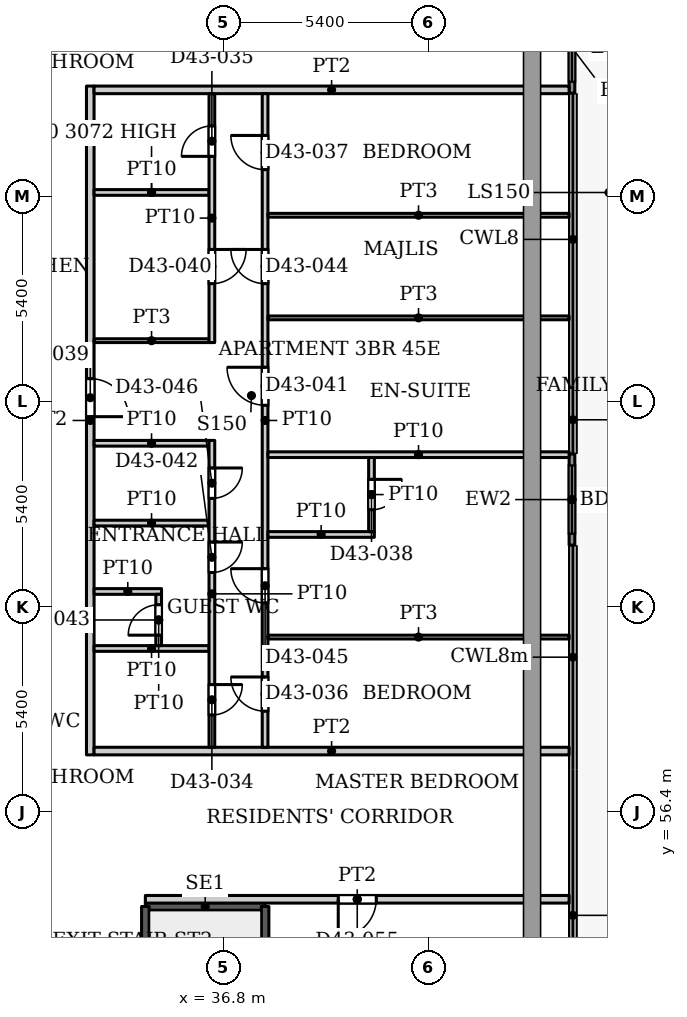
"""IFC4 building model, lengths in metres.
Left out: names, types, materials, properties, quantities, classifications, styles, units other than length and angle.
Written with IfcOpenShell. Run it as: python <this file> out.ifc"""

import sys

from ifc_helpers import new_model, si_unit, direction, frame, frame_2d, origin, place, context, subcontext, project, spatial, rectangle, extrude, source, transform, mapped, element, fill, save


model = new_model("IFC4")
c1 = context("Model", 3, precision=1e-05, world=origin(), true_north=direction((0.0, 1.0)))
c2 = subcontext(c1, "Body", "Model", "MODEL_VIEW")
j1 = project(units=[si_unit("LENGTHUNIT", "METRE"), si_unit("PLANEANGLEUNIT", "RADIAN")], contexts=[c1])
p1 = place(None, origin())
s1 = spatial("IfcSite", under=j1, at=p1, CompositionType="ELEMENT")
p2 = place(p1, origin())
s2 = spatial("IfcBuilding", under=s1, at=p2, CompositionType="ELEMENT")
p3 = place(p2, frame((0.0, 0.0, 191.6)))
s3 = spatial("IfcBuildingStorey", under=s2, at=p3, CompositionType="ELEMENT", Elevation=191.6)
p4 = place(p3, frame((45.975, 77.712, 0.0), z_axis=(0.0, 0.0, 1.0), x_axis=(0.0, -1.0, 0.0)))
e1 = element("IfcWall", 1, at=p4, inside=s3, PredefinedType="SOLIDWALL", context=c2, shape_type="SweptSolid", body=[
    extrude(rectangle(XDim=2.4, YDim=0.15, at=frame_2d((1.2, 0.0))), origin(), (0.0, 0.0, 1.0), 3.75),
])
p5 = place(p4, frame((0.3, 0.0, 0.0)))
e2 = element("IfcOpeningElement", 2, at=p5, cuts=e1, PredefinedType="OPENING", context=c2, shape_type="SweptSolid", body=[
    extrude(rectangle(XDim=1.8, YDim=2.4, at=frame_2d((0.9, 1.2))), frame((0.0, 0.085, 0.0), z_axis=(0.0, -1.0, 0.0), x_axis=(1.0, 0.0, 0.0)), (0.0, 0.0, 1.0), 0.17),
])
p6 = place(p3, frame((45.975, 65.818, 0.0), z_axis=(0.0, 0.0, 1.0), x_axis=(0.0, -1.0, 0.0)))
e3 = element("IfcWall", 3, at=p6, inside=s3, PredefinedType="SOLIDWALL", context=c2, shape_type="SweptSolid", body=[
    extrude(rectangle(XDim=2.4, YDim=0.15, at=frame_2d((1.2, 0.0))), origin(), (0.0, 0.0, 1.0), 3.75),
])
p7 = place(p6, frame((0.3, 0.0, 0.0)))
e4 = element("IfcOpeningElement", 4, at=p7, cuts=e3, PredefinedType="OPENING", context=c2, shape_type="SweptSolid", body=[
    extrude(rectangle(XDim=1.8, YDim=2.4, at=frame_2d((0.9, 1.2))), frame((0.0, 0.085, 0.0), z_axis=(0.0, -1.0, 0.0), x_axis=(1.0, 0.0, 0.0)), (0.0, 0.0, 1.0), 0.17),
])
p8 = place(p3, frame((34.75, 53.91, 0.0), z_axis=(0.0, 0.0, 1.0), x_axis=(1.0, 0.0, 0.0)))
e5 = element("IfcWall", 5, at=p8, inside=s3, PredefinedType="SHEAR", context=c2, shape_type="SweptSolid", body=[
    extrude(rectangle(XDim=3.15, YDim=0.2, at=frame_2d((1.575, 0.0))), origin(), (0.0, 0.0, 1.0), 3.9),
])
p9 = place(p3, frame((34.75, 47.5, 0.0), z_axis=(0.0, 0.0, 1.0), x_axis=(0.0, 1.0, 0.0)))
e6 = element("IfcWall", 6, at=p9, inside=s3, PredefinedType="SHEAR", context=c2, shape_type="SweptSolid", body=[
    extrude(rectangle(XDim=6.41, YDim=0.2, at=frame_2d((3.205, 0.0))), origin(), (0.0, 0.0, 1.0), 3.9),
])
p10 = place(p3, frame((37.9, 44.75, 0.0), z_axis=(0.0, 0.0, 1.0), x_axis=(0.0, 1.0, 0.0)))
e7 = element("IfcWall", 7, at=p10, inside=s3, PredefinedType="SHEAR", context=c2, shape_type="SweptSolid", body=[
    extrude(rectangle(XDim=9.16, YDim=0.2, at=frame_2d((4.58, 0.0))), origin(), (0.0, 0.0, 1.0), 3.9),
])
p11 = place(p3, frame((33.3, 57.9, 0.0), z_axis=(0.0, 0.0, 1.0), x_axis=(0.0, 1.0, 0.0)))
e8 = element("IfcWall", 8, at=p11, inside=s3, PredefinedType="PARTITIONING", context=c2, shape_type="SweptSolid", body=[
    extrude(rectangle(XDim=17.6, YDim=0.2, at=frame_2d((8.8, 0.0))), origin(), (0.0, 0.0, 1.0), 3.6),
])
p12 = place(p11, frame((8.9, 0.0, 0.0)))
e9 = element("IfcOpeningElement", 9, at=p12, cuts=e8, PredefinedType="OPENING", context=c2, shape_type="SweptSolid", body=[
    extrude(rectangle(XDim=1.0, YDim=2.1, at=frame_2d((0.5, 1.05))), frame((0.0, 0.11, 0.0), z_axis=(0.0, -1.0, 0.0), x_axis=(1.0, 0.0, 0.0)), (0.0, 0.0, 1.0), 0.22),
])
p13 = place(p3, frame((33.4, 58.0, 0.0), z_axis=(0.0, 0.0, 1.0), x_axis=(1.0, 0.0, 0.0)))
e10 = element("IfcWall", 10, at=p13, inside=s3, PredefinedType="PARTITIONING", context=c2, shape_type="SweptSolid", body=[
    extrude(rectangle(XDim=12.5, YDim=0.2, at=frame_2d((6.25, 0.0))), origin(), (0.0, 0.0, 1.0), 3.6),
])
p14 = place(p3, frame((33.4, 60.7, 0.0), z_axis=(0.0, 0.0, 1.0), x_axis=(1.0, 0.0, 0.0)))
e11 = element("IfcWall", 11, at=p14, inside=s3, PredefinedType="PARTITIONING", context=c2, shape_type="SweptSolid", body=[
    extrude(rectangle(XDim=3.025, YDim=0.15, at=frame_2d((1.513, 0.0))), origin(), (0.0, 0.0, 1.0), 3.6),
])
p15 = place(p3, frame((33.4, 62.2, 0.0), z_axis=(0.0, 0.0, 1.0), x_axis=(1.0, 0.0, 0.0)))
e12 = element("IfcWall", 12, at=p15, inside=s3, PredefinedType="PARTITIONING", context=c2, shape_type="SweptSolid", body=[
    extrude(rectangle(XDim=1.775, YDim=0.15, at=frame_2d((0.888, 0.0))), origin(), (0.0, 0.0, 1.0), 3.6),
])
for number, where, z_axis, x_axis in (
    (13, (33.4, 64.0, 0.0), (0.0, 0.0, 1.0), (1.0, 0.0, 0.0)),
    (14, (33.4, 66.1, 0.0), (0.0, 0.0, 1.0), (1.0, 0.0, 0.0)),
):
    element("IfcWall", number, at=place(p3, frame(where, z_axis=z_axis, x_axis=x_axis)), inside=s3, PredefinedType="PARTITIONING", context=c2, shape_type="SweptSolid", body=[
        extrude(rectangle(XDim=3.025, YDim=0.15, at=frame_2d((1.513, 0.0))), origin(), (0.0, 0.0, 1.0), 3.6),
    ])
p16 = place(p3, frame((33.4, 68.8, 0.0), z_axis=(0.0, 0.0, 1.0), x_axis=(1.0, 0.0, 0.0)))
e15 = element("IfcWall", 15, at=p16, inside=s3, PredefinedType="PARTITIONING", context=c2, shape_type="SweptSolid", body=[
    extrude(rectangle(XDim=3.025, YDim=0.1, at=frame_2d((1.513, 0.0))), origin(), (0.0, 0.0, 1.0), 3.6),
])
p17 = place(p3, frame((33.4, 72.7, 0.0), z_axis=(0.0, 0.0, 1.0), x_axis=(1.0, 0.0, 0.0)))
e16 = element("IfcWall", 16, at=p17, inside=s3, PredefinedType="PARTITIONING", context=c2, shape_type="SweptSolid", body=[
    extrude(rectangle(XDim=3.025, YDim=0.15, at=frame_2d((1.513, 0.0))), origin(), (0.0, 0.0, 1.0), 3.072),
])
p18 = place(p3, frame((33.4, 75.4, 0.0), z_axis=(0.0, 0.0, 1.0), x_axis=(1.0, 0.0, 0.0)))
e17 = element("IfcWall", 17, at=p18, inside=s3, PredefinedType="PARTITIONING", context=c2, shape_type="SweptSolid", body=[
    extrude(rectangle(XDim=12.5, YDim=0.2, at=frame_2d((6.25, 0.0))), origin(), (0.0, 0.0, 1.0), 3.6),
])
p19 = place(p3, frame((34.75, 54.1, 0.0), z_axis=(0.0, 0.0, 1.0), x_axis=(1.0, 0.0, 0.0)))
e18 = element("IfcWall", 18, at=p19, inside=s3, PredefinedType="PARTITIONING", context=c2, shape_type="SweptSolid", body=[
    extrude(rectangle(XDim=11.15, YDim=0.2, at=frame_2d((5.575, 0.0))), origin(), (0.0, 0.0, 1.0), 3.6),
])
p20 = place(p19, frame((5.075, 0.0, 0.0)))
e19 = element("IfcOpeningElement", 19, at=p20, cuts=e18, PredefinedType="OPENING", context=c2, shape_type="SweptSolid", body=[
    extrude(rectangle(XDim=1.0, YDim=2.1, at=frame_2d((0.5, 1.05))), frame((0.0, 0.11, 0.0), z_axis=(0.0, -1.0, 0.0), x_axis=(1.0, 0.0, 0.0)), (0.0, 0.0, 1.0), 0.22),
])
p21 = place(p3, frame((35.1, 60.775, 0.0), z_axis=(0.0, 0.0, 1.0), x_axis=(0.0, 1.0, 0.0)))
e20 = element("IfcWall", 20, at=p21, inside=s3, PredefinedType="PARTITIONING", context=c2, shape_type="SweptSolid", body=[
    extrude(rectangle(XDim=1.35, YDim=0.15, at=frame_2d((0.675, 0.0))), origin(), (0.0, 0.0, 1.0), 3.6),
])
p22 = place(p21, frame((0.275, 0.0, 0.0)))
e21 = element("IfcOpeningElement", 21, at=p22, cuts=e20, PredefinedType="OPENING", context=c2, shape_type="SweptSolid", body=[
    extrude(rectangle(XDim=0.8, YDim=2.1, at=frame_2d((0.4, 1.05))), frame((0.0, 0.085, 0.0), z_axis=(0.0, -1.0, 0.0), x_axis=(1.0, 0.0, 0.0)), (0.0, 0.0, 1.0), 0.17),
])
p23 = place(p3, frame((36.5, 58.1, 0.0), z_axis=(0.0, 0.0, 1.0), x_axis=(0.0, 1.0, 0.0)))
e22 = element("IfcWall", 22, at=p23, inside=s3, PredefinedType="PARTITIONING", context=c2, shape_type="SweptSolid", body=[
    extrude(rectangle(XDim=8.075, YDim=0.15, at=frame_2d((4.038, 0.0))), origin(), (0.0, 0.0, 1.0), 3.6),
])
p24 = place(p23, frame((0.85, 0.0, 0.0)))
e23 = element("IfcOpeningElement", 23, at=p24, cuts=e22, PredefinedType="OPENING", context=c2, shape_type="SweptSolid", body=[
    extrude(rectangle(XDim=0.8, YDim=2.1, at=frame_2d((0.4, 1.05))), frame((0.0, 0.085, 0.0), z_axis=(0.0, -1.0, 0.0), x_axis=(1.0, 0.0, 0.0)), (0.0, 0.0, 1.0), 0.17),
])
p25 = place(p23, frame((4.6, 0.0, 0.0)))
e24 = element("IfcOpeningElement", 24, at=p25, cuts=e22, PredefinedType="OPENING", context=c2, shape_type="SweptSolid", body=[
    extrude(rectangle(XDim=0.8, YDim=2.1, at=frame_2d((0.4, 1.05))), frame((0.0, 0.085, 0.0), z_axis=(0.0, -1.0, 0.0), x_axis=(1.0, 0.0, 0.0)), (0.0, 0.0, 1.0), 0.17),
])
p26 = place(p23, frame((6.55, 0.0, 0.0)))
e25 = element("IfcOpeningElement", 25, at=p26, cuts=e22, PredefinedType="OPENING", context=c2, shape_type="SweptSolid", body=[
    extrude(rectangle(XDim=0.8, YDim=2.1, at=frame_2d((0.4, 1.05))), frame((0.0, 0.085, 0.0), z_axis=(0.0, -1.0, 0.0), x_axis=(1.0, 0.0, 0.0)), (0.0, 0.0, 1.0), 0.17),
])
p27 = place(p3, frame((36.5, 68.75, 0.0), z_axis=(0.0, 0.0, 1.0), x_axis=(0.0, 1.0, 0.0)))
e26 = element("IfcWall", 26, at=p27, inside=s3, PredefinedType="PARTITIONING", context=c2, shape_type="SweptSolid", body=[
    extrude(rectangle(XDim=6.55, YDim=0.15, at=frame_2d((3.275, 0.0))), origin(), (0.0, 0.0, 1.0), 3.6),
])
p28 = place(p27, frame((4.9, 0.0, 0.0)))
e27 = element("IfcOpeningElement", 27, at=p28, cuts=e26, PredefinedType="OPENING", context=c2, shape_type="SweptSolid", body=[
    extrude(rectangle(XDim=0.8, YDim=2.1, at=frame_2d((0.4, 1.05))), frame((0.0, 0.085, 0.0), z_axis=(0.0, -1.0, 0.0), x_axis=(1.0, 0.0, 0.0)), (0.0, 0.0, 1.0), 0.17),
])
p29 = place(p27, frame((1.55, 0.0, 0.0)))
e28 = element("IfcOpeningElement", 28, at=p29, cuts=e26, PredefinedType="OPENING", context=c2, shape_type="SweptSolid", body=[
    extrude(rectangle(XDim=0.9, YDim=2.1, at=frame_2d((0.45, 1.05))), frame((0.0, 0.085, 0.0), z_axis=(0.0, -1.0, 0.0), x_axis=(1.0, 0.0, 0.0)), (0.0, 0.0, 1.0), 0.17),
])
p30 = place(p3, frame((37.9, 58.1, 0.0), z_axis=(0.0, 0.0, 1.0), x_axis=(0.0, 1.0, 0.0)))
e29 = element("IfcWall", 29, at=p30, inside=s3, PredefinedType="PARTITIONING", context=c2, shape_type="SweptSolid", body=[
    extrude(rectangle(XDim=17.2, YDim=0.15, at=frame_2d((8.6, 0.0))), origin(), (0.0, 0.0, 1.0), 3.6),
])
p31 = place(p30, frame((0.95, 0.0, 0.0)))
e30 = element("IfcOpeningElement", 30, at=p31, cuts=e29, PredefinedType="OPENING", context=c2, shape_type="SweptSolid", body=[
    extrude(rectangle(XDim=0.9, YDim=2.1, at=frame_2d((0.45, 1.05))), frame((0.0, 0.085, 0.0), z_axis=(0.0, -1.0, 0.0), x_axis=(1.0, 0.0, 0.0)), (0.0, 0.0, 1.0), 0.17),
])
p32 = place(p30, frame((15.2, 0.0, 0.0)))
e31 = element("IfcOpeningElement", 31, at=p32, cuts=e29, PredefinedType="OPENING", context=c2, shape_type="SweptSolid", body=[
    extrude(rectangle(XDim=0.9, YDim=2.1, at=frame_2d((0.45, 1.05))), frame((0.0, 0.085, 0.0), z_axis=(0.0, -1.0, 0.0), x_axis=(1.0, 0.0, 0.0)), (0.0, 0.0, 1.0), 0.17),
])
p33 = place(p30, frame((9.0, 0.0, 0.0)))
e32 = element("IfcOpeningElement", 32, at=p33, cuts=e29, PredefinedType="OPENING", context=c2, shape_type="SweptSolid", body=[
    extrude(rectangle(XDim=1.0, YDim=2.1, at=frame_2d((0.5, 1.05))), frame((0.0, 0.085, 0.0), z_axis=(0.0, -1.0, 0.0), x_axis=(1.0, 0.0, 0.0)), (0.0, 0.0, 1.0), 0.17),
])
p34 = place(p30, frame((12.2, 0.0, 0.0)))
e33 = element("IfcOpeningElement", 33, at=p34, cuts=e29, PredefinedType="OPENING", context=c2, shape_type="SweptSolid", body=[
    extrude(rectangle(XDim=0.9, YDim=2.1, at=frame_2d((0.45, 1.05))), frame((0.0, 0.085, 0.0), z_axis=(0.0, -1.0, 0.0), x_axis=(1.0, 0.0, 0.0)), (0.0, 0.0, 1.0), 0.17),
])
p35 = place(p30, frame((3.8, 0.0, 0.0)))
e34 = element("IfcOpeningElement", 34, at=p35, cuts=e29, PredefinedType="OPENING", context=c2, shape_type="SweptSolid", body=[
    extrude(rectangle(XDim=0.9, YDim=2.1, at=frame_2d((0.45, 1.05))), frame((0.0, 0.085, 0.0), z_axis=(0.0, -1.0, 0.0), x_axis=(1.0, 0.0, 0.0)), (0.0, 0.0, 1.0), 0.17),
])
p36 = place(p3, frame((37.975, 61.0, 0.0), z_axis=(0.0, 0.0, 1.0), x_axis=(1.0, 0.0, 0.0)))
e35 = element("IfcWall", 35, at=p36, inside=s3, PredefinedType="PARTITIONING", context=c2, shape_type="SweptSolid", body=[
    extrude(rectangle(XDim=7.925, YDim=0.1, at=frame_2d((3.962, 0.0))), origin(), (0.0, 0.0, 1.0), 3.6),
])
p37 = place(p3, frame((37.975, 63.7, 0.0), z_axis=(0.0, 0.0, 1.0), x_axis=(1.0, 0.0, 0.0)))
e36 = element("IfcWall", 36, at=p37, inside=s3, PredefinedType="PARTITIONING", context=c2, shape_type="SweptSolid", body=[
    extrude(rectangle(XDim=2.8, YDim=0.15, at=frame_2d((1.4, 0.0))), origin(), (0.0, 0.0, 1.0), 3.6),
])
p38 = place(p3, frame((37.975, 65.8, 0.0), z_axis=(0.0, 0.0, 1.0), x_axis=(1.0, 0.0, 0.0)))
e37 = element("IfcWall", 37, at=p38, inside=s3, PredefinedType="PARTITIONING", context=c2, shape_type="SweptSolid", body=[
    extrude(rectangle(XDim=7.925, YDim=0.15, at=frame_2d((3.962, 0.0))), origin(), (0.0, 0.0, 1.0), 3.6),
])
for number, where, z_axis, x_axis in (
    (38, (37.975, 69.4, 0.0), (0.0, 0.0, 1.0), (1.0, 0.0, 0.0)),
    (39, (37.975, 72.1, 0.0), (0.0, 0.0, 1.0), (1.0, 0.0, 0.0)),
):
    element("IfcWall", number, at=place(p3, frame(where, z_axis=z_axis, x_axis=x_axis)), inside=s3, PredefinedType="PARTITIONING", context=c2, shape_type="SweptSolid", body=[
        extrude(rectangle(XDim=7.925, YDim=0.1, at=frame_2d((3.962, 0.0))), origin(), (0.0, 0.0, 1.0), 3.6),
    ])
p39 = place(p3, frame((40.7, 63.775, 0.0), z_axis=(0.0, 0.0, 1.0), x_axis=(0.0, 1.0, 0.0)))
e40 = element("IfcWall", 40, at=p39, inside=s3, PredefinedType="PARTITIONING", context=c2, shape_type="SweptSolid", body=[
    extrude(rectangle(XDim=1.95, YDim=0.15, at=frame_2d((0.975, 0.0))), origin(), (0.0, 0.0, 1.0), 3.6),
])
p40 = place(p39, frame((0.575, 0.0, 0.0)))
e41 = element("IfcOpeningElement", 41, at=p40, cuts=e40, PredefinedType="OPENING", context=c2, shape_type="SweptSolid", body=[
    extrude(rectangle(XDim=0.8, YDim=2.1, at=frame_2d((0.4, 1.05))), frame((0.0, 0.085, 0.0), z_axis=(0.0, -1.0, 0.0), x_axis=(1.0, 0.0, 0.0)), (0.0, 0.0, 1.0), 0.17),
])
m1 = source(origin(), c2, "Body", "SweptSolid", [
    extrude(rectangle(XDim=1.8, YDim=2.4, at=frame_2d((0.9, 1.2))), frame((0.0, 0.025, 0.0), z_axis=(0.0, -1.0, 0.0), x_axis=(1.0, 0.0, 0.0)), (0.0, 0.0, 1.0), 0.05),
])
p41 = place(p5, origin())
e42 = element("IfcDoor", 42, at=p41, inside=s3, OperationType="SLIDING_TO_LEFT", PredefinedType="DOOR", context=c2, shape_type="MappedRepresentation", body=[
    mapped(m1, transform((0.0, 0.0, 0.0), x_axis=(1.0, 0.0, 0.0), y_axis=(0.0, 1.0, 0.0), z_axis=(0.0, 0.0, 1.0), scale=1.0)),
])
fill(e2, e42)
p42 = place(p7, origin())
e43 = element("IfcDoor", 43, at=p42, inside=s3, OperationType="SLIDING_TO_LEFT", PredefinedType="DOOR", context=c2, shape_type="MappedRepresentation", body=[
    mapped(m1, transform((0.0, 0.0, 0.0), x_axis=(1.0, 0.0, 0.0), y_axis=(0.0, 1.0, 0.0), z_axis=(0.0, 0.0, 1.0), scale=1.0)),
])
fill(e4, e43)
m2 = source(origin(), c2, "Body", "SweptSolid", [
    extrude(rectangle(XDim=0.8, YDim=2.1, at=frame_2d((0.4, 1.05))), frame((0.0, 0.025, 0.0), z_axis=(0.0, -1.0, 0.0), x_axis=(1.0, 0.0, 0.0)), (0.0, 0.0, 1.0), 0.05),
])
p43 = place(p24, origin())
e44 = element("IfcDoor", 44, at=p43, inside=s3, OperationType="SINGLE_SWING_RIGHT", PredefinedType="DOOR", context=c2, shape_type="MappedRepresentation", body=[
    mapped(m2, transform((0.0, 0.0, 0.0), x_axis=(1.0, 0.0, 0.0), y_axis=(0.0, 1.0, 0.0), z_axis=(0.0, 0.0, 1.0), scale=1.0)),
])
fill(e23, e44)
p44 = place(p28, origin())
e45 = element("IfcDoor", 45, at=p44, inside=s3, OperationType="SINGLE_SWING_LEFT", PredefinedType="DOOR", context=c2, shape_type="MappedRepresentation", body=[
    mapped(m2, transform((0.0, 0.0, 0.0), x_axis=(1.0, 0.0, 0.0), y_axis=(0.0, 1.0, 0.0), z_axis=(0.0, 0.0, 1.0), scale=1.0)),
])
fill(e27, e45)
m3 = source(origin(), c2, "Body", "SweptSolid", [
    extrude(rectangle(XDim=0.9, YDim=2.1, at=frame_2d((0.45, 1.05))), frame((0.0, 0.025, 0.0), z_axis=(0.0, -1.0, 0.0), x_axis=(1.0, 0.0, 0.0)), (0.0, 0.0, 1.0), 0.05),
])
p45 = place(p31, origin())
e46 = element("IfcDoor", 46, at=p45, inside=s3, OperationType="SINGLE_SWING_LEFT", PredefinedType="DOOR", context=c2, shape_type="MappedRepresentation", body=[
    mapped(m3, transform((0.0, 0.0, 0.0), x_axis=(1.0, 0.0, 0.0), y_axis=(0.0, 1.0, 0.0), z_axis=(0.0, 0.0, 1.0), scale=1.0)),
])
fill(e30, e46)
p46 = place(p32, origin())
e47 = element("IfcDoor", 47, at=p46, inside=s3, OperationType="SINGLE_SWING_LEFT", PredefinedType="DOOR", context=c2, shape_type="MappedRepresentation", body=[
    mapped(m3, transform((0.0, 0.0, 0.0), x_axis=(1.0, 0.0, 0.0), y_axis=(0.0, 1.0, 0.0), z_axis=(0.0, 0.0, 1.0), scale=1.0)),
])
fill(e31, e47)
p47 = place(p40, origin())
e48 = element("IfcDoor", 48, at=p47, inside=s3, OperationType="SINGLE_SWING_RIGHT", PredefinedType="DOOR", context=c2, shape_type="MappedRepresentation", body=[
    mapped(m2, transform((0.0, 0.0, 0.0), x_axis=(1.0, 0.0, 0.0), y_axis=(0.0, 1.0, 0.0), z_axis=(0.0, 0.0, 1.0), scale=1.0)),
])
fill(e41, e48)
m4 = source(origin(), c2, "Body", "SweptSolid", [
    extrude(rectangle(XDim=1.0, YDim=2.1, at=frame_2d((0.5, 1.05))), frame((0.0, 0.025, 0.0), z_axis=(0.0, -1.0, 0.0), x_axis=(1.0, 0.0, 0.0)), (0.0, 0.0, 1.0), 0.05),
])
p48 = place(p12, origin())
e49 = element("IfcDoor", 49, at=p48, inside=s3, OperationType="SINGLE_SWING_RIGHT", PredefinedType="DOOR", context=c2, shape_type="MappedRepresentation", body=[
    mapped(m4, transform((0.0, 0.0, 0.0), x_axis=(1.0, 0.0, 0.0), y_axis=(0.0, 1.0, 0.0), z_axis=(0.0, 0.0, 1.0), scale=1.0)),
])
fill(e9, e49)
p49 = place(p29, origin())
e50 = element("IfcDoor", 50, at=p49, inside=s3, OperationType="SINGLE_SWING_RIGHT", PredefinedType="DOOR", context=c2, shape_type="MappedRepresentation", body=[
    mapped(m3, transform((0.0, 0.0, 0.0), x_axis=(1.0, 0.0, 0.0), y_axis=(0.0, 1.0, 0.0), z_axis=(0.0, 0.0, 1.0), scale=1.0)),
])
fill(e28, e50)
m5 = source(origin(), c2, "Body", "SweptSolid", [
    extrude(rectangle(XDim=1.0, YDim=2.1, at=frame_2d((0.5, 1.05))), frame((0.0, 0.025, 0.0), z_axis=(0.0, -1.0, 0.0), x_axis=(1.0, 0.0, 0.0)), (0.0, 0.0, 1.0), 0.05),
])
p50 = place(p33, origin())
e51 = element("IfcDoor", 51, at=p50, inside=s3, OperationType="SINGLE_SWING_LEFT", PredefinedType="DOOR", context=c2, shape_type="MappedRepresentation", body=[
    mapped(m5, transform((0.0, 0.0, 0.0), x_axis=(1.0, 0.0, 0.0), y_axis=(0.0, 1.0, 0.0), z_axis=(0.0, 0.0, 1.0), scale=1.0)),
])
fill(e32, e51)
p51 = place(p25, origin())
e52 = element("IfcDoor", 52, at=p51, inside=s3, OperationType="SINGLE_SWING_RIGHT", PredefinedType="DOOR", context=c2, shape_type="MappedRepresentation", body=[
    mapped(m2, transform((0.0, 0.0, 0.0), x_axis=(1.0, 0.0, 0.0), y_axis=(0.0, 1.0, 0.0), z_axis=(0.0, 0.0, 1.0), scale=1.0)),
])
fill(e24, e52)
p52 = place(p22, origin())
e53 = element("IfcDoor", 53, at=p52, inside=s3, OperationType="SINGLE_SWING_LEFT", PredefinedType="DOOR", context=c2, shape_type="MappedRepresentation", body=[
    mapped(m2, transform((0.0, 0.0, 0.0), x_axis=(1.0, 0.0, 0.0), y_axis=(0.0, 1.0, 0.0), z_axis=(0.0, 0.0, 1.0), scale=1.0)),
])
fill(e21, e53)
p53 = place(p34, origin())
e54 = element("IfcDoor", 54, at=p53, inside=s3, OperationType="SINGLE_SWING_LEFT", PredefinedType="DOOR", context=c2, shape_type="MappedRepresentation", body=[
    mapped(m3, transform((0.0, 0.0, 0.0), x_axis=(1.0, 0.0, 0.0), y_axis=(0.0, 1.0, 0.0), z_axis=(0.0, 0.0, 1.0), scale=1.0)),
])
fill(e33, e54)
p54 = place(p35, origin())
e55 = element("IfcDoor", 55, at=p54, inside=s3, OperationType="SINGLE_SWING_LEFT", PredefinedType="DOOR", context=c2, shape_type="MappedRepresentation", body=[
    mapped(m3, transform((0.0, 0.0, 0.0), x_axis=(1.0, 0.0, 0.0), y_axis=(0.0, 1.0, 0.0), z_axis=(0.0, 0.0, 1.0), scale=1.0)),
])
fill(e34, e55)
p55 = place(p26, origin())
e56 = element("IfcDoor", 56, at=p55, inside=s3, OperationType="SINGLE_SWING_RIGHT", PredefinedType="DOOR", context=c2, shape_type="MappedRepresentation", body=[
    mapped(m2, transform((0.0, 0.0, 0.0), x_axis=(1.0, 0.0, 0.0), y_axis=(0.0, 1.0, 0.0), z_axis=(0.0, 0.0, 1.0), scale=1.0)),
])
fill(e25, e56)
m6 = source(origin(), c2, "Body", "SweptSolid", [
    extrude(rectangle(XDim=1.0, YDim=2.1, at=frame_2d((0.5, 1.05))), frame((0.0, 0.025, 0.0), z_axis=(0.0, -1.0, 0.0), x_axis=(1.0, 0.0, 0.0)), (0.0, 0.0, 1.0), 0.05),
])
p56 = place(p20, origin())
e57 = element("IfcDoor", 57, at=p56, inside=s3, OperationType="SINGLE_SWING_RIGHT", PredefinedType="DOOR", context=c2, shape_type="MappedRepresentation", body=[
    mapped(m6, transform((0.0, 0.0, 0.0), x_axis=(1.0, 0.0, 0.0), y_axis=(0.0, 1.0, 0.0), z_axis=(0.0, 0.0, 1.0), scale=1.0)),
])
fill(e19, e57)
save(model, sys.argv[1])
